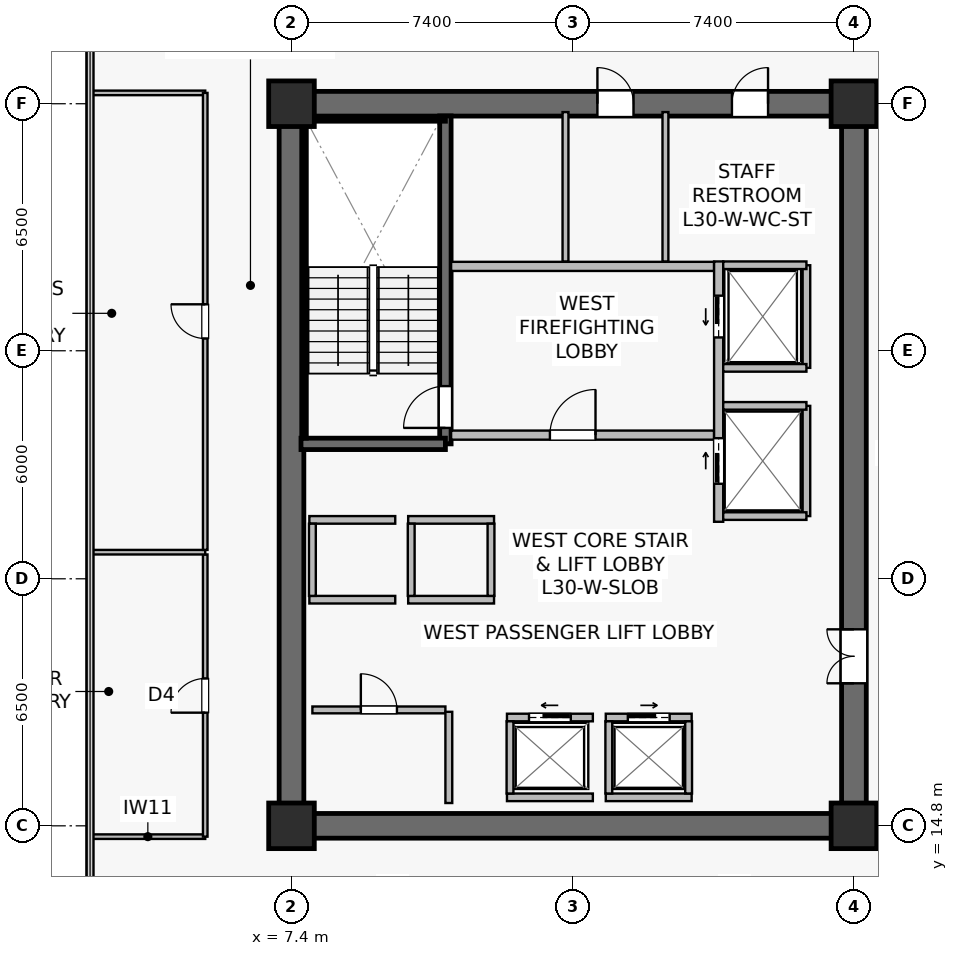
"""IFC4 building model, lengths in metres.
Left out: names, types, materials, properties, quantities, classifications, styles, units other than length and angle.
Written with IfcOpenShell. Run it as: python <this file> out.ifc"""

import sys

from ifc_helpers import new_model, si_unit, direction, frame, frame_2d, origin, origin_2d, place, context, subcontext, project, spatial, rectangle, extrude, source, transform, mapped, element, fill, save


model = new_model("IFC4")
c1 = context("Model", 3, precision=1e-05, world=origin(), true_north=direction((0.0, 1.0)))
c2 = subcontext(c1, "Body", "Model", "MODEL_VIEW")
j1 = project(units=[si_unit("LENGTHUNIT", "METRE"), si_unit("PLANEANGLEUNIT", "RADIAN")], contexts=[c1])
p1 = place(None, origin())
s1 = spatial("IfcSite", under=j1, at=p1, CompositionType="ELEMENT")
p2 = place(p1, origin())
s2 = spatial("IfcBuilding", under=s1, at=p2, CompositionType="ELEMENT")
p3 = place(p2, frame((0.0, 0.0, 125.6)))
s3 = spatial("IfcBuildingStorey", under=s2, at=p3, CompositionType="ELEMENT", Elevation=125.6)
p4 = place(p3, frame((7.075, 14.8, 0.0), z_axis=(0.0, 0.0, 1.0), x_axis=(1.0, 0.0, 0.0)))
e1 = element("IfcWall", 1, at=p4, inside=s3, PredefinedType="SHEAR", context=c2, shape_type="SweptSolid", body=[
    extrude(rectangle(XDim=15.45, YDim=0.65, at=frame_2d((7.725, 0.0))), origin(), (0.0, 0.0, 1.0), 3.79),
])
p5 = place(p3, frame((7.075, 33.8, 0.0), z_axis=(0.0, 0.0, 1.0), x_axis=(1.0, 0.0, 0.0)))
e2 = element("IfcWall", 2, at=p5, inside=s3, PredefinedType="SHEAR", context=c2, shape_type="SweptSolid", body=[
    extrude(rectangle(XDim=15.45, YDim=0.65, at=frame_2d((7.725, 0.0))), origin(), (0.0, 0.0, 1.0), 3.79),
])
p6 = place(p5, frame((8.375, 0.0, 0.0)))
e3 = element("IfcOpeningElement", 3, at=p6, cuts=e2, PredefinedType="OPENING", context=c2, shape_type="SweptSolid", body=[
    extrude(rectangle(XDim=0.95, YDim=2.15, at=frame_2d((0.475, 1.075))), frame((0.0, 0.335, 0.0), z_axis=(0.0, -1.0, 0.0), x_axis=(1.0, 0.0, 0.0)), (0.0, 0.0, 1.0), 0.67),
])
p7 = place(p5, frame((11.915, 0.0, 0.0)))
e4 = element("IfcOpeningElement", 4, at=p7, cuts=e2, PredefinedType="OPENING", context=c2, shape_type="SweptSolid", body=[
    extrude(rectangle(XDim=0.95, YDim=2.15, at=frame_2d((0.475, 1.075))), frame((0.0, 0.335, 0.0), z_axis=(0.0, -1.0, 0.0), x_axis=(1.0, 0.0, 0.0)), (0.0, 0.0, 1.0), 0.67),
])
p8 = place(p3, frame((7.4, 15.125, 0.0), z_axis=(0.0, 0.0, 1.0), x_axis=(0.0, 1.0, 0.0)))
e5 = element("IfcWall", 5, at=p8, inside=s3, PredefinedType="SHEAR", context=c2, shape_type="SweptSolid", body=[
    extrude(rectangle(XDim=18.35, YDim=0.65, at=frame_2d((9.175, 0.0))), origin(), (0.0, 0.0, 1.0), 3.79),
])
p9 = place(p3, frame((22.2, 15.125, 0.0), z_axis=(0.0, 0.0, 1.0), x_axis=(0.0, 1.0, 0.0)))
e6 = element("IfcWall", 6, at=p9, inside=s3, PredefinedType="SHEAR", context=c2, shape_type="SweptSolid", body=[
    extrude(rectangle(XDim=18.35, YDim=0.65, at=frame_2d((9.175, 0.0))), origin(), (0.0, 0.0, 1.0), 3.79),
])
p10 = place(p9, frame((3.425, 0.0, 0.0)))
e7 = element("IfcOpeningElement", 7, at=p10, cuts=e6, PredefinedType="OPENING", context=c2, shape_type="SweptSolid", body=[
    extrude(rectangle(XDim=1.42, YDim=2.2, at=frame_2d((0.71, 1.1))), frame((0.0, 0.335, 0.0), z_axis=(0.0, -1.0, 0.0), x_axis=(1.0, 0.0, 0.0)), (0.0, 0.0, 1.0), 0.67),
])
p11 = place(p3, frame((11.45, 24.85, 0.0), z_axis=(0.0, 0.0, 1.0), x_axis=(0.0, 1.0, 0.0)))
e8 = element("IfcWall", 8, at=p11, inside=s3, PredefinedType="SHEAR", context=c2, shape_type="SweptSolid", body=[
    extrude(rectangle(XDim=8.63, YDim=0.3, at=frame_2d((4.315, 0.0))), origin(), (0.0, 0.0, 1.0), 3.79),
])
p12 = place(p11, frame((0.42, 0.0, 0.0)))
e9 = element("IfcOpeningElement", 9, at=p12, cuts=e8, PredefinedType="OPENING", context=c2, shape_type="SweptSolid", body=[
    extrude(rectangle(XDim=1.1, YDim=2.15, at=frame_2d((0.55, 1.075))), frame((0.0, 0.16, 0.0), z_axis=(0.0, -1.0, 0.0), x_axis=(1.0, 0.0, 0.0)), (0.0, 0.0, 1.0), 0.32),
])
p13 = place(p3, frame((7.65, 24.85, 0.0), z_axis=(0.0, 0.0, 1.0), x_axis=(1.0, 0.0, 0.0)))
e10 = element("IfcWall", 10, at=p13, inside=s3, PredefinedType="SHEAR", context=c2, shape_type="SweptSolid", body=[
    extrude(rectangle(XDim=3.8, YDim=0.3, at=frame_2d((1.9, 0.0))), origin(), (0.0, 0.0, 1.0), 3.79),
])
p14 = place(p3, frame((7.73, 33.4, 0.0), z_axis=(0.0, 0.0, 1.0), x_axis=(1.0, 0.0, 0.0)))
e11 = element("IfcWall", 11, at=p14, inside=s3, PredefinedType="SOLIDWALL", context=c2, shape_type="SweptSolid", body=[
    extrude(rectangle(XDim=3.72, YDim=0.12, at=frame_2d((1.86, 0.0))), origin(), (0.0, 0.0, 1.0), 3.79),
])
p15 = place(p3, frame((7.73, 25.0, 0.0), z_axis=(0.0, 0.0, 1.0), x_axis=(0.0, 1.0, 0.0)))
e12 = element("IfcWall", 12, at=p15, inside=s3, PredefinedType="SOLIDWALL", context=c2, shape_type="SweptSolid", body=[
    extrude(rectangle(XDim=8.32, YDim=0.12, at=frame_2d((4.16, 0.0))), origin(), (0.0, 0.0, 1.0), 3.79),
])
m1 = source(origin(), c2, "Body", "SweptSolid", [
    extrude(rectangle(XDim=1.2, YDim=1.2, at=origin_2d()), origin(), (0.0, 0.0, 1.0), 4.1),
])
for number, where, z_axis, x_axis in (
    (13, (7.4, 14.8, 0.0), (0.0, 0.0, 1.0), (1.0, 0.0, 0.0)),
    (14, (22.2, 14.8, 0.0), (0.0, 0.0, 1.0), (1.0, 0.0, 0.0)),
    (15, (7.4, 33.8, 0.0), (0.0, 0.0, 1.0), (1.0, 0.0, 0.0)),
    (16, (22.2, 33.8, 0.0), (0.0, 0.0, 1.0), (1.0, 0.0, 0.0)),
):
    element("IfcColumn", number, at=place(p3, frame(where, z_axis=z_axis, x_axis=x_axis)), inside=s3, PredefinedType="COLUMN", context=c2, shape_type="MappedRepresentation", body=[
        mapped(m1, transform((0.0, 0.0, 0.0), scale=1.0)),
    ])
p16 = place(p3, frame((11.6, 25.08, 0.0), z_axis=(0.0, 0.0, 1.0), x_axis=(1.0, 0.0, 0.0)))
e17 = element("IfcWall", 17, at=p16, inside=s3, PredefinedType="SOLIDWALL", context=c2, shape_type="SweptSolid", body=[
    extrude(rectangle(XDim=6.92, YDim=0.24, at=frame_2d((3.46, 0.0))), origin(), (0.0, 0.0, 1.0), 3.125),
])
p17 = place(p16, frame((2.6, 0.0, 0.0)))
e18 = element("IfcOpeningElement", 18, at=p17, cuts=e17, PredefinedType="OPENING", context=c2, shape_type="SweptSolid", body=[
    extrude(rectangle(XDim=1.2, YDim=2.16, at=frame_2d((0.6, 1.08))), frame((0.0, 0.13, 0.0), z_axis=(0.0, -1.0, 0.0), x_axis=(1.0, 0.0, 0.0)), (0.0, 0.0, 1.0), 0.26),
])
p18 = place(p3, frame((11.6, 29.52, 0.0), z_axis=(0.0, 0.0, 1.0), x_axis=(1.0, 0.0, 0.0)))
e19 = element("IfcWall", 19, at=p18, inside=s3, PredefinedType="SOLIDWALL", context=c2, shape_type="SweptSolid", body=[
    extrude(rectangle(XDim=6.92, YDim=0.24, at=frame_2d((3.46, 0.0))), origin(), (0.0, 0.0, 1.0), 3.125),
])
p19 = place(p3, frame((18.64, 22.8, 0.0), z_axis=(0.0, 0.0, 1.0), x_axis=(0.0, 1.0, 0.0)))
e20 = element("IfcWall", 20, at=p19, inside=s3, PredefinedType="SOLIDWALL", context=c2, shape_type="SweptSolid", body=[
    extrude(rectangle(XDim=6.85, YDim=0.24, at=frame_2d((3.425, 0.0))), origin(), (0.0, 0.0, 1.0), 2.875),
])
p20 = place(p19, frame((4.85, 0.0, 0.0)))
e21 = element("IfcOpeningElement", 21, at=p20, cuts=e20, PredefinedType="OPENING", context=c2, shape_type="SweptSolid", body=[
    extrude(rectangle(XDim=1.1, YDim=2.22, at=frame_2d((0.55, 1.11))), frame((0.0, 0.13, 0.0), z_axis=(0.0, -1.0, 0.0), x_axis=(1.0, 0.0, 0.0)), (0.0, 0.0, 1.0), 0.26),
])
p21 = place(p19, frame((1.0, 0.0, 0.0)))
e22 = element("IfcOpeningElement", 22, at=p21, cuts=e20, PredefinedType="OPENING", context=c2, shape_type="SweptSolid", body=[
    extrude(rectangle(XDim=1.2, YDim=2.22, at=frame_2d((0.6, 1.11))), frame((0.0, 0.13, 0.0), z_axis=(0.0, -1.0, 0.0), x_axis=(1.0, 0.0, 0.0)), (0.0, 0.0, 1.0), 0.26),
])
p22 = place(p3, frame((13.07, 17.65, 0.0), z_axis=(0.0, 0.0, 1.0), x_axis=(1.0, 0.0, 0.0)))
e23 = element("IfcWall", 23, at=p22, inside=s3, PredefinedType="SOLIDWALL", context=c2, shape_type="SweptSolid", body=[
    extrude(rectangle(XDim=2.26, YDim=0.2, at=frame_2d((1.13, 0.0))), origin(), (0.0, 0.0, 1.0), 3.125),
])
p23 = place(p22, frame((0.58, 0.0, 0.0)))
e24 = element("IfcOpeningElement", 24, at=p23, cuts=e23, PredefinedType="OPENING", context=c2, shape_type="SweptSolid", body=[
    extrude(rectangle(XDim=1.1, YDim=2.22, at=frame_2d((0.55, 1.11))), frame((0.0, 0.11, 0.0), z_axis=(0.0, -1.0, 0.0), x_axis=(1.0, 0.0, 0.0)), (0.0, 0.0, 1.0), 0.22),
])
p24 = place(p3, frame((13.07, 15.55, 0.0), z_axis=(0.0, 0.0, 1.0), x_axis=(1.0, 0.0, 0.0)))
e25 = element("IfcWall", 25, at=p24, inside=s3, PredefinedType="SOLIDWALL", context=c2, shape_type="SweptSolid", body=[
    extrude(rectangle(XDim=2.26, YDim=0.2, at=frame_2d((1.13, 0.0))), origin(), (0.0, 0.0, 1.0), 3.125),
])
p25 = place(p3, frame((13.15, 15.65, 0.0), z_axis=(0.0, 0.0, 1.0), x_axis=(0.0, 1.0, 0.0)))
e26 = element("IfcWall", 26, at=p25, inside=s3, PredefinedType="SOLIDWALL", context=c2, shape_type="SweptSolid", body=[
    extrude(rectangle(XDim=1.9, YDim=0.18, at=frame_2d((0.95, 0.0))), origin(), (0.0, 0.0, 1.0), 3.79),
])
p26 = place(p3, frame((15.67, 17.65, 0.0), z_axis=(0.0, 0.0, 1.0), x_axis=(1.0, 0.0, 0.0)))
e27 = element("IfcWall", 27, at=p26, inside=s3, PredefinedType="SOLIDWALL", context=c2, shape_type="SweptSolid", body=[
    extrude(rectangle(XDim=2.26, YDim=0.2, at=frame_2d((1.13, 0.0))), origin(), (0.0, 0.0, 1.0), 3.79),
])
p27 = place(p26, frame((0.58, 0.0, 0.0)))
e28 = element("IfcOpeningElement", 28, at=p27, cuts=e27, PredefinedType="OPENING", context=c2, shape_type="SweptSolid", body=[
    extrude(rectangle(XDim=1.1, YDim=2.22, at=frame_2d((0.55, 1.11))), frame((0.0, 0.11, 0.0), z_axis=(0.0, -1.0, 0.0), x_axis=(1.0, 0.0, 0.0)), (0.0, 0.0, 1.0), 0.22),
])
p28 = place(p3, frame((15.67, 15.55, 0.0), z_axis=(0.0, 0.0, 1.0), x_axis=(1.0, 0.0, 0.0)))
e29 = element("IfcWall", 29, at=p28, inside=s3, PredefinedType="SOLIDWALL", context=c2, shape_type="SweptSolid", body=[
    extrude(rectangle(XDim=2.26, YDim=0.2, at=frame_2d((1.13, 0.0))), origin(), (0.0, 0.0, 1.0), 3.79),
])
for number, where, z_axis, x_axis in (
    (30, (15.75, 15.65, 0.0), (0.0, 0.0, 1.0), (0.0, 1.0, 0.0)),
    (31, (17.85, 15.65, 0.0), (0.0, 0.0, 1.0), (0.0, 1.0, 0.0)),
):
    element("IfcWall", number, at=place(p3, frame(where, z_axis=z_axis, x_axis=x_axis)), inside=s3, PredefinedType="SOLIDWALL", context=c2, shape_type="SweptSolid", body=[
        extrude(rectangle(XDim=1.9, YDim=0.18, at=frame_2d((0.95, 0.0))), origin(), (0.0, 0.0, 1.0), 3.79),
    ])
for number, where, z_axis, x_axis in (
    (32, (7.87, 20.75, 0.0), (0.0, 0.0, 1.0), (1.0, 0.0, 0.0)),
    (33, (7.87, 22.85, 0.0), (0.0, 0.0, 1.0), (1.0, 0.0, 0.0)),
):
    element("IfcWall", number, at=place(p3, frame(where, z_axis=z_axis, x_axis=x_axis)), inside=s3, PredefinedType="SOLIDWALL", context=c2, shape_type="SweptSolid", body=[
        extrude(rectangle(XDim=2.26, YDim=0.2, at=frame_2d((1.13, 0.0))), origin(), (0.0, 0.0, 1.0), 3.79),
    ])
p29 = place(p3, frame((7.95, 20.85, 0.0), z_axis=(0.0, 0.0, 1.0), x_axis=(0.0, 1.0, 0.0)))
e34 = element("IfcWall", 34, at=p29, inside=s3, PredefinedType="SOLIDWALL", context=c2, shape_type="SweptSolid", body=[
    extrude(rectangle(XDim=1.9, YDim=0.18, at=frame_2d((0.95, 0.0))), origin(), (0.0, 0.0, 1.0), 3.79),
])
for number, where, z_axis, x_axis in (
    (35, (10.47, 20.75, 0.0), (0.0, 0.0, 1.0), (1.0, 0.0, 0.0)),
    (36, (10.47, 22.85, 0.0), (0.0, 0.0, 1.0), (1.0, 0.0, 0.0)),
):
    element("IfcWall", number, at=place(p3, frame(where, z_axis=z_axis, x_axis=x_axis)), inside=s3, PredefinedType="SOLIDWALL", context=c2, shape_type="SweptSolid", body=[
        extrude(rectangle(XDim=2.26, YDim=0.2, at=frame_2d((1.13, 0.0))), origin(), (0.0, 0.0, 1.0), 3.79),
    ])
for number, where, z_axis, x_axis in (
    (37, (10.55, 20.85, 0.0), (0.0, 0.0, 1.0), (0.0, 1.0, 0.0)),
    (38, (12.65, 20.85, 0.0), (0.0, 0.0, 1.0), (0.0, 1.0, 0.0)),
):
    element("IfcWall", number, at=place(p3, frame(where, z_axis=z_axis, x_axis=x_axis)), inside=s3, PredefinedType="SOLIDWALL", context=c2, shape_type="SweptSolid", body=[
        extrude(rectangle(XDim=1.9, YDim=0.18, at=frame_2d((0.95, 0.0))), origin(), (0.0, 0.0, 1.0), 3.79),
    ])
p30 = place(p3, frame((20.95, 26.85, 0.0), z_axis=(0.0, 0.0, 1.0), x_axis=(0.0, 1.0, 0.0)))
e39 = element("IfcWall", 39, at=p30, inside=s3, PredefinedType="SOLIDWALL", context=c2, shape_type="SweptSolid", body=[
    extrude(rectangle(XDim=2.7, YDim=0.2, at=frame_2d((1.35, 0.0))), origin(), (0.0, 0.0, 1.0), 3.79),
])
p31 = place(p3, frame((18.76, 29.55, 0.0), z_axis=(0.0, 0.0, 1.0), x_axis=(1.0, 0.0, 0.0)))
e40 = element("IfcWall", 40, at=p31, inside=s3, PredefinedType="SOLIDWALL", context=c2, shape_type="SweptSolid", body=[
    extrude(rectangle(XDim=2.19, YDim=0.2, at=frame_2d((1.095, 0.0))), origin(), (0.0, 0.0, 1.0), 3.79),
])
p32 = place(p3, frame((18.76, 26.85, 0.0), z_axis=(0.0, 0.0, 1.0), x_axis=(1.0, 0.0, 0.0)))
e41 = element("IfcWall", 41, at=p32, inside=s3, PredefinedType="SOLIDWALL", context=c2, shape_type="SweptSolid", body=[
    extrude(rectangle(XDim=2.19, YDim=0.2, at=frame_2d((1.095, 0.0))), origin(), (0.0, 0.0, 1.0), 3.187),
])
p33 = place(p3, frame((20.95, 22.95, 0.0), z_axis=(0.0, 0.0, 1.0), x_axis=(0.0, 1.0, 0.0)))
e42 = element("IfcWall", 42, at=p33, inside=s3, PredefinedType="SOLIDWALL", context=c2, shape_type="SweptSolid", body=[
    extrude(rectangle(XDim=2.9, YDim=0.2, at=frame_2d((1.45, 0.0))), origin(), (0.0, 0.0, 1.0), 2.875),
])
for number, where, z_axis, x_axis in (
    (43, (18.76, 25.85, 0.0), (0.0, 0.0, 1.0), (1.0, 0.0, 0.0)),
    (44, (18.76, 22.95, 0.0), (0.0, 0.0, 1.0), (1.0, 0.0, 0.0)),
):
    element("IfcWall", number, at=place(p3, frame(where, z_axis=z_axis, x_axis=x_axis)), inside=s3, PredefinedType="SOLIDWALL", context=c2, shape_type="SweptSolid", body=[
        extrude(rectangle(XDim=2.19, YDim=0.2, at=frame_2d((1.095, 0.0))), origin(), (0.0, 0.0, 1.0), 3.79),
    ])
p34 = place(p3, frame((7.95, 17.85, 0.0), z_axis=(0.0, 0.0, 1.0), x_axis=(1.0, 0.0, 0.0)))
e45 = element("IfcWall", 45, at=p34, inside=s3, PredefinedType="SOLIDWALL", context=c2, shape_type="SweptSolid", body=[
    extrude(rectangle(XDim=3.5, YDim=0.18, at=frame_2d((1.75, 0.0))), origin(), (0.0, 0.0, 1.0), 3.79),
])
p35 = place(p34, frame((1.275, 0.0, 0.0)))
e46 = element("IfcOpeningElement", 46, at=p35, cuts=e45, PredefinedType="OPENING", context=c2, shape_type="SweptSolid", body=[
    extrude(rectangle(XDim=0.95, YDim=2.15, at=frame_2d((0.475, 1.075))), frame((0.0, 0.1, 0.0), z_axis=(0.0, -1.0, 0.0), x_axis=(1.0, 0.0, 0.0)), (0.0, 0.0, 1.0), 0.2),
])
p36 = place(p3, frame((11.54, 15.4, 0.0), z_axis=(0.0, 0.0, 1.0), x_axis=(0.0, 1.0, 0.0)))
e47 = element("IfcWall", 47, at=p36, inside=s3, PredefinedType="SOLIDWALL", context=c2, shape_type="SweptSolid", body=[
    extrude(rectangle(XDim=2.4, YDim=0.18, at=frame_2d((1.2, 0.0))), origin(), (0.0, 0.0, 1.0), 3.79),
])
p37 = place(p3, frame((14.61, 29.65, 0.0), z_axis=(0.0, 0.0, 1.0), x_axis=(0.0, 1.0, 0.0)))
e48 = element("IfcWall", 48, at=p37, inside=s3, PredefinedType="PLUMBINGWALL", context=c2, shape_type="SweptSolid", body=[
    extrude(rectangle(XDim=3.93, YDim=0.155, at=frame_2d((1.965, 0.0))), origin(), (0.0, 0.0, 1.0), 3.125),
])
p38 = place(p3, frame((17.24, 29.65, 0.0), z_axis=(0.0, 0.0, 1.0), x_axis=(0.0, 1.0, 0.0)))
e49 = element("IfcWall", 49, at=p38, inside=s3, PredefinedType="PLUMBINGWALL", context=c2, shape_type="SweptSolid", body=[
    extrude(rectangle(XDim=3.93, YDim=0.155, at=frame_2d((1.965, 0.0))), origin(), (0.0, 0.0, 1.0), 3.79),
])
for number, where, z_axis, x_axis in (
    (50, (2.11, 14.515, 0.0), (0.0, 0.0, 1.0), (1.0, 0.0, 0.0)),
    (51, (2.11, 34.085, 0.0), (0.0, 0.0, 1.0), (1.0, 0.0, 0.0)),
):
    element("IfcWall", number, at=place(p3, frame(where, z_axis=z_axis, x_axis=x_axis)), inside=s3, PredefinedType="PARTITIONING", context=c2, shape_type="SweptSolid", body=[
        extrude(rectangle(XDim=3.02, YDim=0.12, at=frame_2d((1.51, 0.0))), origin(), (0.0, 0.0, 1.0), 3.79),
    ])
p39 = place(p3, frame((5.13, 14.515, 0.0), z_axis=(0.0, 0.0, 1.0), x_axis=(0.0, 1.0, 0.0)))
e52 = element("IfcWall", 52, at=p39, inside=s3, PredefinedType="PARTITIONING", context=c2, shape_type="SweptSolid", body=[
    extrude(rectangle(XDim=7.425, YDim=0.12, at=frame_2d((3.712, 0.0))), origin(), (0.0, 0.0, 1.0), 3.79),
])
p40 = place(p39, frame((3.262, 0.0, 0.0)))
e53 = element("IfcOpeningElement", 53, at=p40, cuts=e52, PredefinedType="OPENING", context=c2, shape_type="SweptSolid", body=[
    extrude(rectangle(XDim=0.9, YDim=2.1, at=frame_2d((0.45, 1.05))), frame((0.0, 0.07, 0.0), z_axis=(0.0, -1.0, 0.0), x_axis=(1.0, 0.0, 0.0)), (0.0, 0.0, 1.0), 0.14),
])
p41 = place(p3, frame((2.11, 22.0, 0.0), z_axis=(0.0, 0.0, 1.0), x_axis=(1.0, 0.0, 0.0)))
e54 = element("IfcWall", 54, at=p41, inside=s3, PredefinedType="PARTITIONING", context=c2, shape_type="SweptSolid", body=[
    extrude(rectangle(XDim=3.02, YDim=0.12, at=frame_2d((1.51, 0.0))), origin(), (0.0, 0.0, 1.0), 3.79),
])
p42 = place(p3, frame((5.13, 22.06, 0.0), z_axis=(0.0, 0.0, 1.0), x_axis=(0.0, 1.0, 0.0)))
e55 = element("IfcWall", 55, at=p42, inside=s3, PredefinedType="PARTITIONING", context=c2, shape_type="SweptSolid", body=[
    extrude(rectangle(XDim=12.025, YDim=0.12, at=frame_2d((6.012, 0.0))), origin(), (0.0, 0.0, 1.0), 3.79),
])
p43 = place(p42, frame((5.562, 0.0, 0.0)))
e56 = element("IfcOpeningElement", 56, at=p43, cuts=e55, PredefinedType="OPENING", context=c2, shape_type="SweptSolid", body=[
    extrude(rectangle(XDim=0.9, YDim=2.1, at=frame_2d((0.45, 1.05))), frame((0.0, 0.07, 0.0), z_axis=(0.0, -1.0, 0.0), x_axis=(1.0, 0.0, 0.0)), (0.0, 0.0, 1.0), 0.14),
])
m2 = source(origin(), c2, "Body", "SweptSolid", [
    extrude(rectangle(XDim=1.1, YDim=2.15, at=frame_2d((0.55, 1.075))), frame((0.0, 0.025, 0.0), z_axis=(0.0, -1.0, 0.0), x_axis=(1.0, 0.0, 0.0)), (0.0, 0.0, 1.0), 0.05),
])
p44 = place(p12, origin())
e57 = element("IfcDoor", 57, at=p44, inside=s3, OperationType="SINGLE_SWING_LEFT", PredefinedType="DOOR", context=c2, shape_type="MappedRepresentation", body=[
    mapped(m2, transform((0.0, 0.0, 0.0), scale=1.0)),
])
fill(e9, e57)
m3 = source(origin(), c2, "Body", "SweptSolid", [
    extrude(rectangle(XDim=1.2, YDim=2.16, at=frame_2d((0.6, 1.08))), frame((0.0, 0.025, 0.0), z_axis=(0.0, -1.0, 0.0), x_axis=(1.0, 0.0, 0.0)), (0.0, 0.0, 1.0), 0.05),
])
p45 = place(p17, origin())
e58 = element("IfcDoor", 58, at=p45, inside=s3, OperationType="SINGLE_SWING_RIGHT", PredefinedType="DOOR", context=c2, shape_type="MappedRepresentation", body=[
    mapped(m3, transform((0.0, 0.0, 0.0), scale=1.0)),
])
fill(e18, e58)
m4 = source(origin(), c2, "Body", "SweptSolid", [
    extrude(rectangle(XDim=1.1, YDim=2.22, at=frame_2d((0.55, 1.11))), frame((0.0, 0.025, 0.0), z_axis=(0.0, -1.0, 0.0), x_axis=(1.0, 0.0, 0.0)), (0.0, 0.0, 1.0), 0.05),
])
p46 = place(p23, origin())
e59 = element("IfcDoor", 59, at=p46, inside=s3, OperationType="SLIDING_TO_LEFT", PredefinedType="USERDEFINED", context=c2, shape_type="MappedRepresentation", body=[
    mapped(m4, transform((0.0, 0.0, 0.0), scale=1.0)),
])
fill(e24, e59)
p47 = place(p27, origin())
e60 = element("IfcDoor", 60, at=p47, inside=s3, OperationType="SLIDING_TO_RIGHT", PredefinedType="USERDEFINED", context=c2, shape_type="MappedRepresentation", body=[
    mapped(m4, transform((0.0, 0.0, 0.0), scale=1.0)),
])
fill(e28, e60)
p48 = place(p20, origin())
e61 = element("IfcDoor", 61, at=p48, inside=s3, OperationType="SLIDING_TO_LEFT", PredefinedType="USERDEFINED", context=c2, shape_type="MappedRepresentation", body=[
    mapped(m4, transform((0.0, 0.0, 0.0), scale=1.0)),
])
fill(e21, e61)
m5 = source(origin(), c2, "Body", "SweptSolid", [
    extrude(rectangle(XDim=1.2, YDim=2.22, at=frame_2d((0.6, 1.11))), frame((0.0, 0.025, 0.0), z_axis=(0.0, -1.0, 0.0), x_axis=(1.0, 0.0, 0.0)), (0.0, 0.0, 1.0), 0.05),
])
p49 = place(p21, origin())
e62 = element("IfcDoor", 62, at=p49, inside=s3, OperationType="SLIDING_TO_RIGHT", PredefinedType="USERDEFINED", context=c2, shape_type="MappedRepresentation", body=[
    mapped(m5, transform((0.0, 0.0, 0.0), scale=1.0)),
])
fill(e22, e62)
m6 = source(origin(), c2, "Body", "SweptSolid", [
    extrude(rectangle(XDim=0.95, YDim=2.15, at=frame_2d((0.475, 1.075))), frame((0.0, 0.025, 0.0), z_axis=(0.0, -1.0, 0.0), x_axis=(1.0, 0.0, 0.0)), (0.0, 0.0, 1.0), 0.05),
])
p50 = place(p35, origin())
e63 = element("IfcDoor", 63, at=p50, inside=s3, OperationType="SINGLE_SWING_LEFT", PredefinedType="DOOR", context=c2, shape_type="MappedRepresentation", body=[
    mapped(m6, transform((0.0, 0.0, 0.0), scale=1.0)),
])
fill(e46, e63)
m7 = source(origin(), c2, "Body", "SweptSolid", [
    extrude(rectangle(XDim=1.42, YDim=2.2, at=frame_2d((0.71, 1.1))), frame((0.0, 0.025, 0.0), z_axis=(0.0, -1.0, 0.0), x_axis=(1.0, 0.0, 0.0)), (0.0, 0.0, 1.0), 0.05),
])
p51 = place(p10, origin())
e64 = element("IfcDoor", 64, at=p51, inside=s3, OperationType="DOUBLE_DOOR_SINGLE_SWING", PredefinedType="DOOR", context=c2, shape_type="MappedRepresentation", body=[
    mapped(m7, transform((0.0, 0.0, 0.0), scale=1.0)),
])
fill(e7, e64)
p52 = place(p6, origin())
e65 = element("IfcDoor", 65, at=p52, inside=s3, OperationType="SINGLE_SWING_LEFT", PredefinedType="DOOR", context=c2, shape_type="MappedRepresentation", body=[
    mapped(m6, transform((0.0, 0.0, 0.0), scale=1.0)),
])
fill(e3, e65)
p53 = place(p7, origin())
e66 = element("IfcDoor", 66, at=p53, inside=s3, OperationType="SINGLE_SWING_RIGHT", PredefinedType="DOOR", context=c2, shape_type="MappedRepresentation", body=[
    mapped(m6, transform((0.0, 0.0, 0.0), scale=1.0)),
])
fill(e4, e66)
m8 = source(origin(), c2, "Body", "SweptSolid", [
    extrude(rectangle(XDim=0.9, YDim=2.1, at=frame_2d((0.45, 1.05))), frame((0.0, 0.025, 0.0), z_axis=(0.0, -1.0, 0.0), x_axis=(1.0, 0.0, 0.0)), (0.0, 0.0, 1.0), 0.05),
])
p54 = place(p40, origin())
e67 = element("IfcDoor", 67, at=p54, inside=s3, OperationType="SINGLE_SWING_LEFT", PredefinedType="DOOR", context=c2, shape_type="MappedRepresentation", body=[
    mapped(m8, transform((0.0, 0.0, 0.0), scale=1.0)),
])
fill(e53, e67)
p55 = place(p43, origin())
e68 = element("IfcDoor", 68, at=p55, inside=s3, OperationType="SINGLE_SWING_RIGHT", PredefinedType="DOOR", context=c2, shape_type="MappedRepresentation", body=[
    mapped(m8, transform((0.0, 0.0, 0.0), scale=1.0)),
])
fill(e56, e68)
save(model, sys.argv[1])
